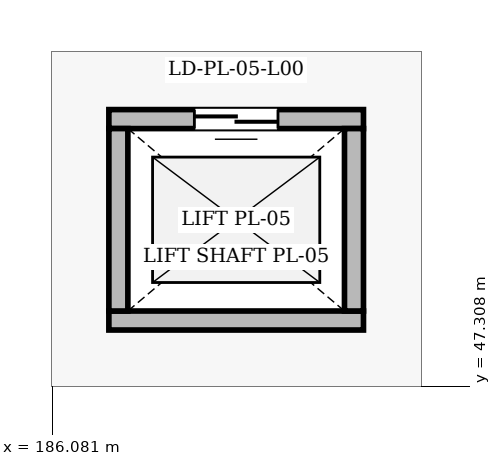
"""IFC4 building model, lengths in metres.
Left out: names, types, materials, properties, quantities, classifications, styles, units other than length and angle.
Written with IfcOpenShell. Run it as: python <this file> out.ifc"""

import sys

from ifc_helpers import new_model, si_unit, direction, frame, frame_2d, origin, place, context, subcontext, project, spatial, rectangle, extrude, element, fill, save


model = new_model("IFC4")
c1 = context("Model", 3, precision=1e-05, world=origin(), true_north=direction((0.0, 1.0)))
c2 = subcontext(c1, "Body", "Model", "MODEL_VIEW")
j1 = project(units=[si_unit("LENGTHUNIT", "METRE"), si_unit("PLANEANGLEUNIT", "RADIAN")], contexts=[c1])
p1 = place(None, origin())
s1 = spatial("IfcSite", under=j1, at=p1, CompositionType="ELEMENT")
p2 = place(p1, origin())
s2 = spatial("IfcBuilding", under=s1, at=p2, CompositionType="ELEMENT")
p3 = place(p2, origin())
s3 = spatial("IfcBuildingStorey", under=s2, at=p3, CompositionType="ELEMENT", Elevation=0.0)
p4 = place(p3, frame((186.825, 48.175, 0.0), z_axis=(0.0, 0.0, 1.0), x_axis=(1.0, 0.0, 0.0)))
e1 = element("IfcWall", 1, at=p4, inside=s3, PredefinedType="SOLIDWALL", context=c2, shape_type="SweptSolid", body=[
    extrude(rectangle(XDim=3.35, YDim=0.25, at=frame_2d((1.675, 0.0))), origin(), (0.0, 0.0, 1.0), 4.708),
])
p5 = place(p3, frame((190.175, 50.825, 0.0), z_axis=(0.0, 0.0, 1.0), x_axis=(-1.0, 0.0, 0.0)))
e2 = element("IfcWall", 2, at=p5, inside=s3, PredefinedType="SOLIDWALL", context=c2, shape_type="SweptSolid", body=[
    extrude(rectangle(XDim=3.35, YDim=0.25, at=frame_2d((1.675, 0.0))), origin(), (0.0, 0.0, 1.0), 4.708),
])
p6 = place(p5, frame((1.125, 0.0, 0.0)))
e3 = element("IfcOpeningElement", 3, at=p6, cuts=e2, PredefinedType="OPENING", context=c2, shape_type="SweptSolid", body=[
    extrude(rectangle(XDim=1.1, YDim=2.2, at=frame_2d((0.55, 1.1))), frame((0.0, 0.135, 0.0), z_axis=(0.0, -1.0, 0.0), x_axis=(1.0, 0.0, 0.0)), (0.0, 0.0, 1.0), 0.27),
])
for number, where, z_axis, x_axis in (
    (4, (186.95, 50.7, 0.0), (0.0, 0.0, 1.0), (0.0, -1.0, 0.0)),
    (5, (190.05, 48.3, 0.0), (0.0, 0.0, 1.0), (0.0, 1.0, 0.0)),
):
    element("IfcWall", number, at=place(p3, frame(where, z_axis=z_axis, x_axis=x_axis)), inside=s3, PredefinedType="SOLIDWALL", context=c2, shape_type="SweptSolid", body=[
        extrude(rectangle(XDim=2.4, YDim=0.25, at=frame_2d((1.2, 0.0))), origin(), (0.0, 0.0, 1.0), 5.18),
    ])
p7 = place(p6, origin())
e6 = element("IfcDoor", 6, at=p7, inside=s3, OperationType="DOUBLE_DOOR_SLIDING", PredefinedType="DOOR", context=c2, shape_type="SweptSolid", body=[
    extrude(rectangle(XDim=1.1, YDim=2.2, at=frame_2d((0.55, 1.1))), frame((0.0, 0.025, 0.0), z_axis=(0.0, -1.0, 0.0), x_axis=(1.0, 0.0, 0.0)), (0.0, 0.0, 1.0), 0.05),
])
fill(e3, e6)
save(model, sys.argv[1])
